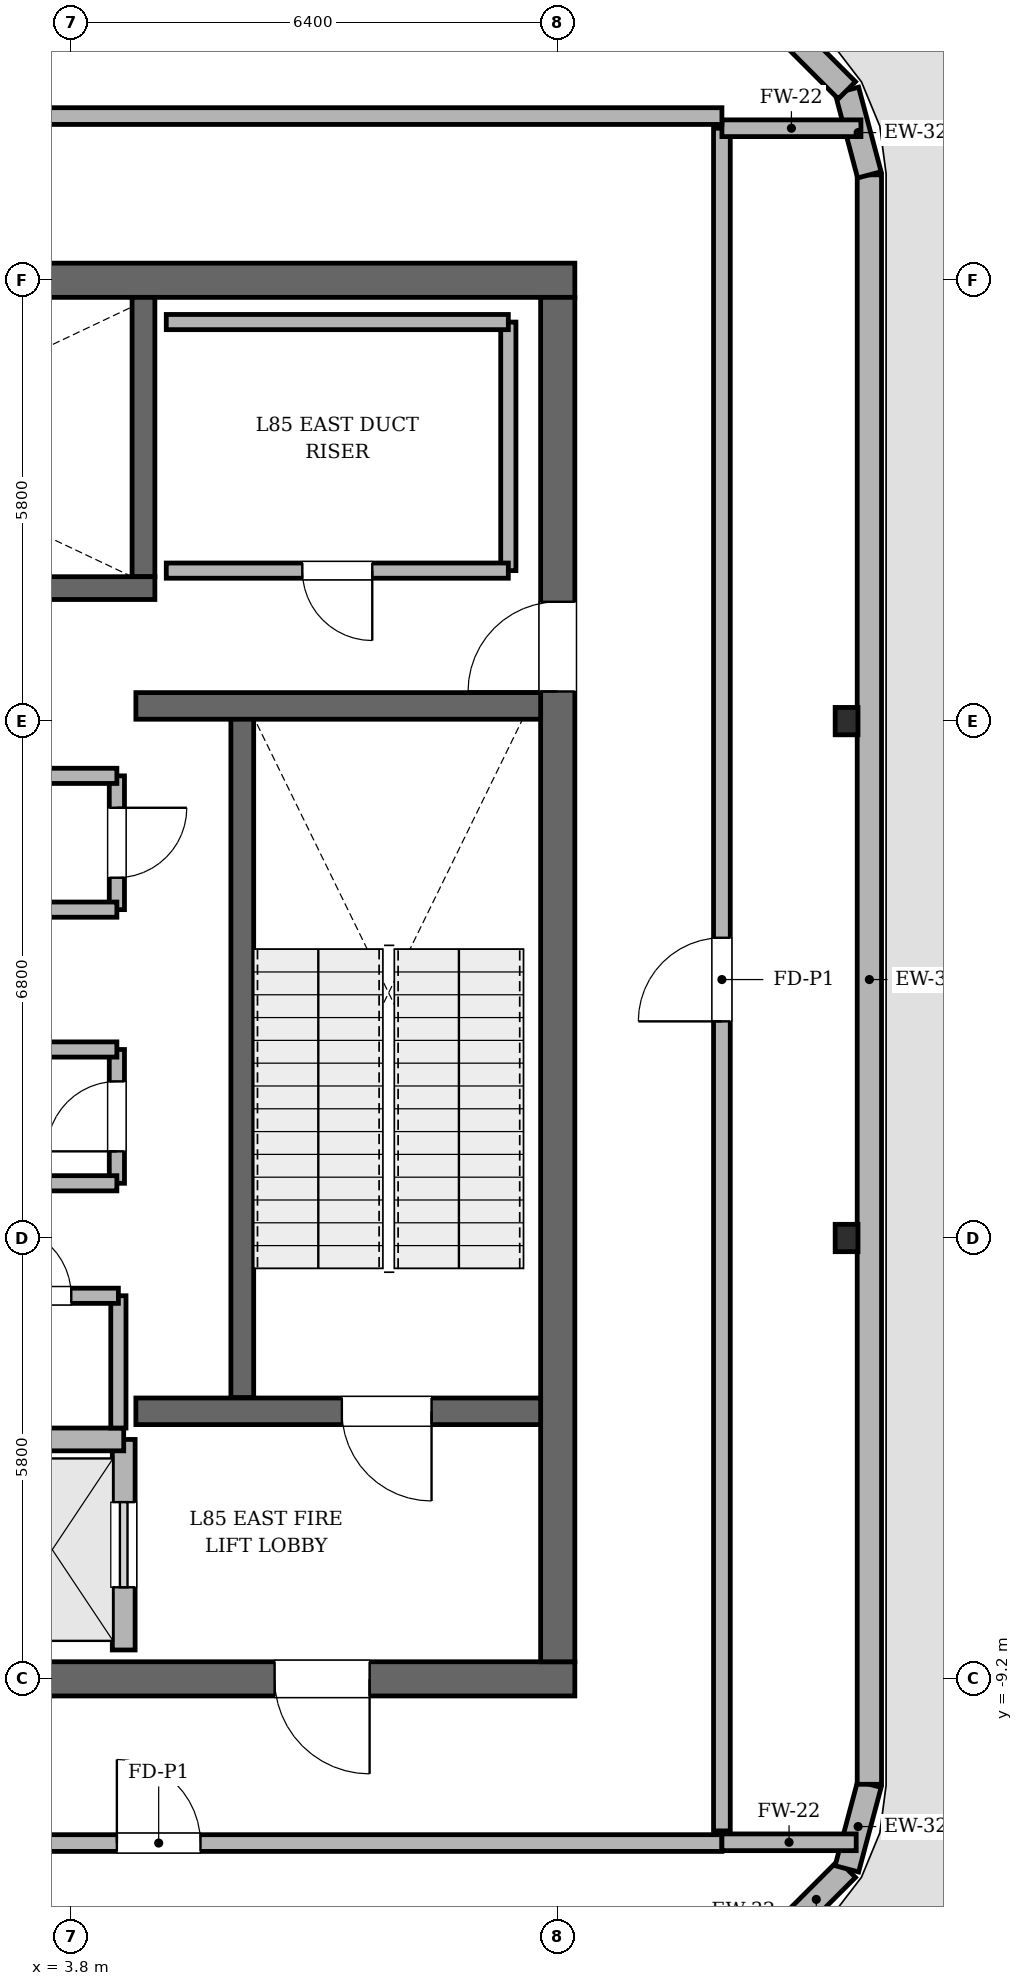
"""IFC4 building model, lengths in metres.
Left out: names, types, materials, properties, quantities, classifications, styles, units other than length and angle.
Written with IfcOpenShell. Run it as: python <this file> out.ifc"""

import sys

from ifc_helpers import new_model, si_unit, direction, frame, frame_2d, origin, origin_2d, place, context, subcontext, project, spatial, rectangle, i_section, extrude, element, fill, save


model = new_model("IFC4")
c1 = context("Model", 3, precision=1e-05, world=origin(), true_north=direction((0.0, 1.0)))
c2 = subcontext(c1, "Body", "Model", "MODEL_VIEW")
j1 = project(units=[si_unit("LENGTHUNIT", "METRE"), si_unit("PLANEANGLEUNIT", "RADIAN")], contexts=[c1])
p1 = place(None, origin())
s1 = spatial("IfcSite", under=j1, at=p1, CompositionType="ELEMENT")
p2 = place(p1, origin())
s2 = spatial("IfcBuilding", under=s1, at=p2, CompositionType="ELEMENT")
p3 = place(p2, frame((0.0, 0.0, 361.8)))
s3 = spatial("IfcBuildingStorey", under=s2, at=p3, CompositionType="ELEMENT", Elevation=361.8)
p4 = place(p3, frame((10.425, -9.2, 0.0), z_axis=(0.0, 0.0, 1.0), x_axis=(-1.0, 0.0, 0.0)))
e1 = element("IfcWall", 1, at=p4, inside=s3, PredefinedType="SHEAR", context=c2, shape_type="SweptSolid", body=[
    extrude(rectangle(XDim=20.85, YDim=0.45, at=frame_2d((10.425, 0.0))), origin(), (0.0, 0.0, 1.0), 4.5),
])
p5 = place(p4, frame((2.7, 0.0, 0.0)))
e2 = element("IfcOpeningElement", 2, at=p5, cuts=e1, PredefinedType="OPENING", context=c2, shape_type="SweptSolid", body=[
    extrude(rectangle(XDim=1.25, YDim=2.25, at=frame_2d((0.625, 1.125))), frame((0.0, 0.235, 0.0), z_axis=(0.0, -1.0, 0.0), x_axis=(1.0, 0.0, 0.0)), (0.0, 0.0, 1.0), 0.47),
])
p6 = place(p4, frame((16.9, 0.0, 0.0)))
e3 = element("IfcOpeningElement", 3, at=p6, cuts=e1, PredefinedType="OPENING", context=c2, shape_type="SweptSolid", body=[
    extrude(rectangle(XDim=1.25, YDim=2.25, at=frame_2d((0.625, 1.125))), frame((0.0, 0.235, 0.0), z_axis=(0.0, -1.0, 0.0), x_axis=(1.0, 0.0, 0.0)), (0.0, 0.0, 1.0), 0.47),
])
p7 = place(p3, frame((-10.425, 9.2, 0.0), z_axis=(0.0, 0.0, 1.0), x_axis=(1.0, 0.0, 0.0)))
e4 = element("IfcWall", 4, at=p7, inside=s3, PredefinedType="SHEAR", context=c2, shape_type="SweptSolid", body=[
    extrude(rectangle(XDim=20.85, YDim=0.45, at=frame_2d((10.425, 0.0))), origin(), (0.0, 0.0, 1.0), 4.5),
])
p8 = place(p3, frame((10.2, 8.975, 0.0), z_axis=(0.0, 0.0, 1.0), x_axis=(0.0, -1.0, 0.0)))
e5 = element("IfcWall", 5, at=p8, inside=s3, PredefinedType="SHEAR", context=c2, shape_type="SweptSolid", body=[
    extrude(rectangle(XDim=17.95, YDim=0.45, at=frame_2d((8.975, 0.0))), origin(), (0.0, 0.0, 1.0), 4.5),
])
p9 = place(p8, frame((4.005, 0.0, 0.0)))
e6 = element("IfcOpeningElement", 6, at=p9, cuts=e5, PredefinedType="OPENING", context=c2, shape_type="SweptSolid", body=[
    extrude(rectangle(XDim=1.18, YDim=2.2, at=frame_2d((0.59, 1.1))), frame((0.0, 0.235, 0.0), z_axis=(0.0, -1.0, 0.0), x_axis=(1.0, 0.0, 0.0)), (0.0, 0.0, 1.0), 0.47),
])
p10 = place(p3, frame((6.05, 3.45, 0.0), z_axis=(0.0, 0.0, 1.0), x_axis=(0.0, -1.0, 0.0)))
e7 = element("IfcWall", 7, at=p10, inside=s3, PredefinedType="SOLIDWALL", context=c2, shape_type="SweptSolid", body=[
    extrude(rectangle(XDim=8.95, YDim=0.3, at=frame_2d((4.475, 0.0))), origin(), (0.0, 0.0, 1.0), 4.5),
])
p11 = place(p3, frame((4.75, 8.975, 0.0), z_axis=(0.0, 0.0, 1.0), x_axis=(0.0, -1.0, 0.0)))
e8 = element("IfcWall", 8, at=p11, inside=s3, PredefinedType="SOLIDWALL", context=c2, shape_type="SweptSolid", body=[
    extrude(rectangle(XDim=3.675, YDim=0.3, at=frame_2d((1.837, 0.0))), origin(), (0.0, 0.0, 1.0), 4.5),
])
p12 = place(p3, frame((-4.9, 5.15, 0.0), z_axis=(0.0, 0.0, 1.0), x_axis=(1.0, 0.0, 0.0)))
e9 = element("IfcWall", 9, at=p12, inside=s3, PredefinedType="SOLIDWALL", context=c2, shape_type="SweptSolid", body=[
    extrude(rectangle(XDim=9.8, YDim=0.3, at=frame_2d((4.9, 0.0))), origin(), (0.0, 0.0, 1.0), 4.5),
])
p13 = place(p12, frame((0.56, 0.0, 0.0)))
e10 = element("IfcOpeningElement", 10, at=p13, cuts=e9, PredefinedType="OPENING", context=c2, shape_type="SweptSolid", body=[
    extrude(rectangle(XDim=1.18, YDim=2.2, at=frame_2d((0.59, 1.1))), frame((0.0, 0.16, 0.0), z_axis=(0.0, -1.0, 0.0), x_axis=(1.0, 0.0, 0.0)), (0.0, 0.0, 1.0), 0.32),
])
p14 = place(p3, frame((4.65, -5.68, 0.0), z_axis=(0.0, 0.0, 1.0), x_axis=(1.0, 0.0, 0.0)))
e11 = element("IfcWall", 11, at=p14, inside=s3, PredefinedType="SOLIDWALL", context=c2, shape_type="SweptSolid", body=[
    extrude(rectangle(XDim=5.325, YDim=0.35, at=frame_2d((2.663, 0.0))), origin(), (0.0, 0.0, 1.0), 4.5),
])
p15 = place(p14, frame((2.71, 0.0, 0.0)))
e12 = element("IfcOpeningElement", 12, at=p15, cuts=e11, PredefinedType="OPENING", context=c2, shape_type="SweptSolid", body=[
    extrude(rectangle(XDim=1.18, YDim=2.2, at=frame_2d((0.59, 1.1))), frame((0.0, 0.185, 0.0), z_axis=(0.0, -1.0, 0.0), x_axis=(1.0, 0.0, 0.0)), (0.0, 0.0, 1.0), 0.37),
])
p16 = place(p3, frame((4.65, 3.6, 0.0), z_axis=(0.0, 0.0, 1.0), x_axis=(1.0, 0.0, 0.0)))
e13 = element("IfcWall", 13, at=p16, inside=s3, PredefinedType="SOLIDWALL", context=c2, shape_type="SweptSolid", body=[
    extrude(rectangle(XDim=5.325, YDim=0.35, at=frame_2d((2.663, 0.0))), origin(), (0.0, 0.0, 1.0), 4.5),
])
for number, where, z_axis, x_axis in (
    (14, (14.0, -3.4, 0.0), (0.0, 0.0, 1.0), (1.0, 0.0, 0.0)),
    (15, (14.0, 3.4, 0.0), (0.0, 0.0, 1.0), (1.0, 0.0, 0.0)),
):
    element("IfcColumn", number, at=place(p3, frame(where, z_axis=z_axis, x_axis=x_axis)), inside=s3, PredefinedType="COLUMN", context=c2, shape_type="SweptSolid", body=[
        extrude(i_section(OverallWidth=0.3, OverallDepth=0.36, WebThickness=0.012, FlangeThickness=0.022, FilletRadius=0.018, at=origin_2d()), origin(), (0.0, 0.0, 1.0), 4.498),
    ])
p17 = place(p3, frame((13.199, -12.504, 0.0), z_axis=(0.0, 0.0, 1.0), x_axis=(0.707106781187, 0.707106781187, 0.0)))
e16 = element("IfcWall", 16, at=p17, inside=s3, PredefinedType="SOLIDWALL", context=c2, shape_type="SweptSolid", body=[
    extrude(rectangle(XDim=1.138, YDim=0.32, at=frame_2d((0.569, 0.0))), origin(), (0.0, 0.0, 1.0), 2.994),
])
p18 = place(p3, frame((14.004, -11.699, 0.0), z_axis=(0.0, 0.0, 1.0), x_axis=(0.25727979053, 0.966336954372, 0.0)))
e17 = element("IfcWall", 17, at=p18, inside=s3, PredefinedType="SOLIDWALL", context=c2, shape_type="SweptSolid", body=[
    extrude(rectangle(XDim=1.151, YDim=0.32, at=frame_2d((0.576, 0.0))), origin(), (0.0, 0.0, 1.0), 2.994),
])
p19 = place(p3, frame((14.3, -10.587, 0.0), z_axis=(0.0, 0.0, 1.0), x_axis=(0.0, 1.0, 0.0)))
e18 = element("IfcWall", 18, at=p19, inside=s3, PredefinedType="SOLIDWALL", context=c2, shape_type="SweptSolid", body=[
    extrude(rectangle(XDim=21.174, YDim=0.32, at=frame_2d((10.587, 0.0))), origin(), (0.0, 0.0, 1.0), 2.994),
])
p20 = place(p3, frame((14.3, 10.587, 0.0), z_axis=(0.0, 0.0, 1.0), x_axis=(-0.25727979053, 0.966336954372, 0.0)))
e19 = element("IfcWall", 19, at=p20, inside=s3, PredefinedType="SOLIDWALL", context=c2, shape_type="SweptSolid", body=[
    extrude(rectangle(XDim=1.151, YDim=0.32, at=frame_2d((0.576, 0.0))), origin(), (0.0, 0.0, 1.0), 2.994),
])
p21 = place(p3, frame((14.004, 11.699, 0.0), z_axis=(0.0, 0.0, 1.0), x_axis=(-0.707106781187, 0.707106781187, 0.0)))
e20 = element("IfcWall", 20, at=p21, inside=s3, PredefinedType="SOLIDWALL", context=c2, shape_type="SweptSolid", body=[
    extrude(rectangle(XDim=1.138, YDim=0.32, at=frame_2d((0.569, 0.0))), origin(), (0.0, 0.0, 1.0), 2.994),
])
p22 = place(p3, frame((4.49, -8.82, 0.0), z_axis=(0.0, 0.0, 1.0), x_axis=(0.0, 1.0, 0.0)))
e21 = element("IfcWall", 21, at=p22, inside=s3, PredefinedType="SOLIDWALL", context=c2, shape_type="SweptSolid", body=[
    extrude(rectangle(XDim=2.77, YDim=0.3, at=frame_2d((1.385, 0.0))), origin(), (0.0, 0.0, 1.0), 4.28),
])
p23 = place(p22, frame((0.825, 0.0, 0.0)))
e22 = element("IfcOpeningElement", 22, at=p23, cuts=e21, PredefinedType="OPENING", context=c2, shape_type="SweptSolid", body=[
    extrude(rectangle(XDim=1.12, YDim=2.25, at=frame_2d((0.56, 1.125))), frame((0.0, 0.16, 0.0), z_axis=(0.0, -1.0, 0.0), x_axis=(1.0, 0.0, 0.0)), (0.0, 0.0, 1.0), 0.32),
])
p24 = place(p3, frame((2.61, -6.05, 0.0), z_axis=(0.0, 0.0, 1.0), x_axis=(1.0, 0.0, 0.0)))
e23 = element("IfcWall", 23, at=p24, inside=s3, PredefinedType="SOLIDWALL", context=c2, shape_type="SweptSolid", body=[
    extrude(rectangle(XDim=1.88, YDim=0.3, at=frame_2d((0.94, 0.0))), origin(), (0.0, 0.0, 1.0), 4.28),
])
p25 = place(p3, frame((4.42, -5.9, 0.0), z_axis=(0.0, 0.0, 1.0), x_axis=(0.0, 1.0, 0.0)))
e24 = element("IfcWall", 24, at=p25, inside=s3, PredefinedType="SOLIDWALL", context=c2, shape_type="SweptSolid", body=[
    extrude(rectangle(XDim=1.74, YDim=0.2, at=frame_2d((0.87, 0.0))), origin(), (0.0, 0.0, 1.0), 4.28),
])
p26 = place(p3, frame((4.42, -4.16, 0.0), z_axis=(0.0, 0.0, 1.0), x_axis=(-1.0, 0.0, 0.0)))
e25 = element("IfcWall", 25, at=p26, inside=s3, PredefinedType="SOLIDWALL", context=c2, shape_type="SweptSolid", body=[
    extrude(rectangle(XDim=2.16, YDim=0.2, at=frame_2d((1.08, 0.0))), origin(), (0.0, 0.0, 1.0), 4.28),
])
p27 = place(p26, frame((0.62, 0.0, 0.0)))
e26 = element("IfcOpeningElement", 26, at=p27, cuts=e25, PredefinedType="OPENING", context=c2, shape_type="SweptSolid", body=[
    extrude(rectangle(XDim=0.92, YDim=2.1, at=frame_2d((0.46, 1.05))), frame((0.0, 0.11, 0.0), z_axis=(0.0, -1.0, 0.0), x_axis=(1.0, 0.0, 0.0)), (0.0, 0.0, 1.0), 0.22),
])
p28 = place(p3, frame((4.4, -2.68, 0.0), z_axis=(0.0, 0.0, 1.0), x_axis=(0.0, 1.0, 0.0)))
e27 = element("IfcWall", 27, at=p28, inside=s3, PredefinedType="SOLIDWALL", context=c2, shape_type="SweptSolid", body=[
    extrude(rectangle(XDim=1.76, YDim=0.2, at=frame_2d((0.88, 0.0))), origin(), (0.0, 0.0, 1.0), 4.28),
])
p29 = place(p28, frame((0.42, 0.0, 0.0)))
e28 = element("IfcOpeningElement", 28, at=p29, cuts=e27, PredefinedType="OPENING", context=c2, shape_type="SweptSolid", body=[
    extrude(rectangle(XDim=0.92, YDim=2.1, at=frame_2d((0.46, 1.05))), frame((0.0, 0.11, 0.0), z_axis=(0.0, -1.0, 0.0), x_axis=(1.0, 0.0, 0.0)), (0.0, 0.0, 1.0), 0.22),
])
for number, where, z_axis, x_axis in (
    (29, (4.4, -0.92, 0.0), (0.0, 0.0, 1.0), (-1.0, 0.0, 0.0)),
    (30, (-4.4, -2.68, 0.0), (0.0, 0.0, 1.0), (1.0, 0.0, 0.0)),
):
    element("IfcWall", number, at=place(p3, frame(where, z_axis=z_axis, x_axis=x_axis)), inside=s3, PredefinedType="SOLIDWALL", context=c2, shape_type="SweptSolid", body=[
        extrude(rectangle(XDim=8.8, YDim=0.2, at=frame_2d((4.4, 0.0))), origin(), (0.0, 0.0, 1.0), 4.28),
    ])
p30 = place(p3, frame((4.4, 0.92, 0.0), z_axis=(0.0, 0.0, 1.0), x_axis=(0.0, 1.0, 0.0)))
e31 = element("IfcWall", 31, at=p30, inside=s3, PredefinedType="SOLIDWALL", context=c2, shape_type="SweptSolid", body=[
    extrude(rectangle(XDim=1.76, YDim=0.2, at=frame_2d((0.88, 0.0))), origin(), (0.0, 0.0, 1.0), 4.28),
])
p31 = place(p30, frame((0.42, 0.0, 0.0)))
e32 = element("IfcOpeningElement", 32, at=p31, cuts=e31, PredefinedType="OPENING", context=c2, shape_type="SweptSolid", body=[
    extrude(rectangle(XDim=0.92, YDim=2.1, at=frame_2d((0.46, 1.05))), frame((0.0, 0.11, 0.0), z_axis=(0.0, -1.0, 0.0), x_axis=(1.0, 0.0, 0.0)), (0.0, 0.0, 1.0), 0.22),
])
for number, where, z_axis, x_axis in (
    (33, (4.4, 2.68, 0.0), (0.0, 0.0, 1.0), (-1.0, 0.0, 0.0)),
    (34, (-4.4, 0.92, 0.0), (0.0, 0.0, 1.0), (1.0, 0.0, 0.0)),
):
    element("IfcWall", number, at=place(p3, frame(where, z_axis=z_axis, x_axis=x_axis)), inside=s3, PredefinedType="SOLIDWALL", context=c2, shape_type="SweptSolid", body=[
        extrude(rectangle(XDim=8.8, YDim=0.2, at=frame_2d((4.4, 0.0))), origin(), (0.0, 0.0, 1.0), 4.28),
    ])
p32 = place(p3, frame((9.55, 5.38, 0.0), z_axis=(0.0, 0.0, 1.0), x_axis=(0.0, 1.0, 0.0)))
e35 = element("IfcWall", 35, at=p32, inside=s3, PredefinedType="SOLIDWALL", context=c2, shape_type="SweptSolid", body=[
    extrude(rectangle(XDim=3.27, YDim=0.2, at=frame_2d((1.635, 0.0))), origin(), (0.0, 0.0, 1.0), 4.28),
])
p33 = place(p3, frame((9.55, 8.65, 0.0), z_axis=(0.0, 0.0, 1.0), x_axis=(-1.0, 0.0, 0.0)))
e36 = element("IfcWall", 36, at=p33, inside=s3, PredefinedType="SOLIDWALL", context=c2, shape_type="SweptSolid", body=[
    extrude(rectangle(XDim=4.5, YDim=0.2, at=frame_2d((2.25, 0.0))), origin(), (0.0, 0.0, 1.0), 4.28),
])
p34 = place(p3, frame((5.05, 5.38, 0.0), z_axis=(0.0, 0.0, 1.0), x_axis=(1.0, 0.0, 0.0)))
e37 = element("IfcWall", 37, at=p34, inside=s3, PredefinedType="SOLIDWALL", context=c2, shape_type="SweptSolid", body=[
    extrude(rectangle(XDim=4.5, YDim=0.2, at=frame_2d((2.25, 0.0))), origin(), (0.0, 0.0, 1.0), 4.28),
])
p35 = place(p34, frame((1.79, 0.0, 0.0)))
e38 = element("IfcOpeningElement", 38, at=p35, cuts=e37, PredefinedType="OPENING", context=c2, shape_type="SweptSolid", body=[
    extrude(rectangle(XDim=0.92, YDim=2.1, at=frame_2d((0.46, 1.05))), frame((0.0, 0.11, 0.0), z_axis=(0.0, -1.0, 0.0), x_axis=(1.0, 0.0, 0.0)), (0.0, 0.0, 1.0), 0.22),
])
p36 = place(p3, frame((-12.36, -11.36, 0.0), z_axis=(0.0, 0.0, 1.0), x_axis=(1.0, 0.0, 0.0)))
e39 = element("IfcWall", 39, at=p36, inside=s3, PredefinedType="SOLIDWALL", context=c2, shape_type="SweptSolid", body=[
    extrude(rectangle(XDim=24.72, YDim=0.22, at=frame_2d((12.36, 0.0))), origin(), (0.0, 0.0, 1.0), 2.994),
])
p37 = place(p36, frame((16.76, 0.0, 0.0)))
e40 = element("IfcOpeningElement", 40, at=p37, cuts=e39, PredefinedType="OPENING", context=c2, shape_type="SweptSolid", body=[
    extrude(rectangle(XDim=1.1, YDim=2.2, at=frame_2d((0.55, 1.1))), frame((0.0, 0.12, 0.0), z_axis=(0.0, -1.0, 0.0), x_axis=(1.0, 0.0, 0.0)), (0.0, 0.0, 1.0), 0.24),
])
p38 = place(p3, frame((12.36, -11.35, 0.0), z_axis=(0.0, 0.0, 1.0), x_axis=(1.0, 0.0, 0.0)))
e41 = element("IfcWall", 41, at=p38, inside=s3, PredefinedType="SOLIDWALL", context=c2, shape_type="SweptSolid", body=[
    extrude(rectangle(XDim=1.767, YDim=0.22, at=frame_2d((0.883, 0.0))), origin(), (0.0, 0.0, 1.0), 2.994),
])
p39 = place(p3, frame((12.36, -11.2, 0.0), z_axis=(0.0, 0.0, 1.0), x_axis=(0.0, 1.0, 0.0)))
e42 = element("IfcWall", 42, at=p39, inside=s3, PredefinedType="SOLIDWALL", context=c2, shape_type="SweptSolid", body=[
    extrude(rectangle(XDim=22.4, YDim=0.22, at=frame_2d((11.2, 0.0))), origin(), (0.0, 0.0, 1.0), 2.994),
])
p40 = place(p39, frame((10.65, 0.0, 0.0)))
e43 = element("IfcOpeningElement", 43, at=p40, cuts=e42, PredefinedType="OPENING", context=c2, shape_type="SweptSolid", body=[
    extrude(rectangle(XDim=1.1, YDim=2.2, at=frame_2d((0.55, 1.1))), frame((0.0, 0.12, 0.0), z_axis=(0.0, -1.0, 0.0), x_axis=(1.0, 0.0, 0.0)), (0.0, 0.0, 1.0), 0.24),
])
p41 = place(p3, frame((12.36, 11.2, 0.0), z_axis=(0.0, 0.0, 1.0), x_axis=(1.0, 0.0, 0.0)))
e44 = element("IfcWall", 44, at=p41, inside=s3, PredefinedType="SOLIDWALL", context=c2, shape_type="SweptSolid", body=[
    extrude(rectangle(XDim=1.829, YDim=0.22, at=frame_2d((0.915, 0.0))), origin(), (0.0, 0.0, 1.0), 2.994),
])
p42 = place(p3, frame((12.36, 11.36, 0.0), z_axis=(0.0, 0.0, 1.0), x_axis=(-1.0, 0.0, 0.0)))
e45 = element("IfcWall", 45, at=p42, inside=s3, PredefinedType="SOLIDWALL", context=c2, shape_type="SweptSolid", body=[
    extrude(rectangle(XDim=24.72, YDim=0.22, at=frame_2d((12.36, 0.0))), origin(), (0.0, 0.0, 1.0), 2.994),
])
p43 = place(p42, frame((16.76, 0.0, 0.0)))
e46 = element("IfcOpeningElement", 46, at=p43, cuts=e45, PredefinedType="OPENING", context=c2, shape_type="SweptSolid", body=[
    extrude(rectangle(XDim=1.1, YDim=2.2, at=frame_2d((0.55, 1.1))), frame((0.0, 0.12, 0.0), z_axis=(0.0, -1.0, 0.0), x_axis=(1.0, 0.0, 0.0)), (0.0, 0.0, 1.0), 0.24),
])
p44 = place(p15, origin())
e47 = element("IfcDoor", 47, at=p44, inside=s3, OperationType="SINGLE_SWING_RIGHT", PredefinedType="DOOR", context=c2, shape_type="SweptSolid", body=[
    extrude(rectangle(XDim=1.18, YDim=2.2, at=frame_2d((0.59, 1.1))), frame((0.0, 0.025, 0.0), z_axis=(0.0, -1.0, 0.0), x_axis=(1.0, 0.0, 0.0)), (0.0, 0.0, 1.0), 0.05),
])
fill(e12, e47)
p45 = place(p5, origin())
e48 = element("IfcDoor", 48, at=p45, inside=s3, OperationType="SINGLE_SWING_LEFT", PredefinedType="DOOR", context=c2, shape_type="SweptSolid", body=[
    extrude(rectangle(XDim=1.25, YDim=2.25, at=frame_2d((0.625, 1.125))), frame((0.0, 0.025, 0.0), z_axis=(0.0, -1.0, 0.0), x_axis=(1.0, 0.0, 0.0)), (0.0, 0.0, 1.0), 0.05),
])
fill(e2, e48)
p46 = place(p9, origin())
e49 = element("IfcDoor", 49, at=p46, inside=s3, OperationType="SINGLE_SWING_RIGHT", PredefinedType="DOOR", context=c2, shape_type="SweptSolid", body=[
    extrude(rectangle(XDim=1.18, YDim=2.2, at=frame_2d((0.59, 1.1))), frame((0.0, 0.025, 0.0), z_axis=(0.0, -1.0, 0.0), x_axis=(1.0, 0.0, 0.0)), (0.0, 0.0, 1.0), 0.05),
])
fill(e6, e49)
p47 = place(p23, origin())
e50 = element("IfcDoor", 50, at=p47, inside=s3, OperationType="SLIDING_TO_RIGHT", PredefinedType="DOOR", context=c2, shape_type="SweptSolid", body=[
    extrude(rectangle(XDim=1.12, YDim=2.25, at=frame_2d((0.56, 1.125))), frame((0.0, 0.025, 0.0), z_axis=(0.0, -1.0, 0.0), x_axis=(1.0, 0.0, 0.0)), (0.0, 0.0, 1.0), 0.05),
])
fill(e22, e50)
p48 = place(p27, origin())
e51 = element("IfcDoor", 51, at=p48, inside=s3, OperationType="SINGLE_SWING_RIGHT", PredefinedType="DOOR", context=c2, shape_type="SweptSolid", body=[
    extrude(rectangle(XDim=0.92, YDim=2.1, at=frame_2d((0.46, 1.05))), frame((0.0, 0.025, 0.0), z_axis=(0.0, -1.0, 0.0), x_axis=(1.0, 0.0, 0.0)), (0.0, 0.0, 1.0), 0.05),
])
fill(e26, e51)
p49 = place(p29, origin())
e52 = element("IfcDoor", 52, at=p49, inside=s3, OperationType="SINGLE_SWING_LEFT", PredefinedType="DOOR", context=c2, shape_type="SweptSolid", body=[
    extrude(rectangle(XDim=0.92, YDim=2.1, at=frame_2d((0.46, 1.05))), frame((0.0, 0.025, 0.0), z_axis=(0.0, -1.0, 0.0), x_axis=(1.0, 0.0, 0.0)), (0.0, 0.0, 1.0), 0.05),
])
fill(e28, e52)
p50 = place(p31, origin())
e53 = element("IfcDoor", 53, at=p50, inside=s3, OperationType="SINGLE_SWING_RIGHT", PredefinedType="DOOR", context=c2, shape_type="SweptSolid", body=[
    extrude(rectangle(XDim=0.92, YDim=2.1, at=frame_2d((0.46, 1.05))), frame((0.0, 0.025, 0.0), z_axis=(0.0, -1.0, 0.0), x_axis=(1.0, 0.0, 0.0)), (0.0, 0.0, 1.0), 0.05),
])
fill(e32, e53)
p51 = place(p35, origin())
e54 = element("IfcDoor", 54, at=p51, inside=s3, OperationType="SINGLE_SWING_RIGHT", PredefinedType="DOOR", context=c2, shape_type="SweptSolid", body=[
    extrude(rectangle(XDim=0.92, YDim=2.1, at=frame_2d((0.46, 1.05))), frame((0.0, 0.025, 0.0), z_axis=(0.0, -1.0, 0.0), x_axis=(1.0, 0.0, 0.0)), (0.0, 0.0, 1.0), 0.05),
])
fill(e38, e54)
p52 = place(p37, origin())
e55 = element("IfcDoor", 55, at=p52, inside=s3, OperationType="SINGLE_SWING_LEFT", PredefinedType="DOOR", context=c2, shape_type="SweptSolid", body=[
    extrude(rectangle(XDim=1.1, YDim=2.2, at=frame_2d((0.55, 1.1))), frame((0.0, 0.025, 0.0), z_axis=(0.0, -1.0, 0.0), x_axis=(1.0, 0.0, 0.0)), (0.0, 0.0, 1.0), 0.05),
])
fill(e40, e55)
p53 = place(p40, origin())
e56 = element("IfcDoor", 56, at=p53, inside=s3, OperationType="SINGLE_SWING_LEFT", PredefinedType="DOOR", context=c2, shape_type="SweptSolid", body=[
    extrude(rectangle(XDim=1.1, YDim=2.2, at=frame_2d((0.55, 1.1))), frame((0.0, 0.025, 0.0), z_axis=(0.0, -1.0, 0.0), x_axis=(1.0, 0.0, 0.0)), (0.0, 0.0, 1.0), 0.05),
])
fill(e43, e56)
save(model, sys.argv[1])
